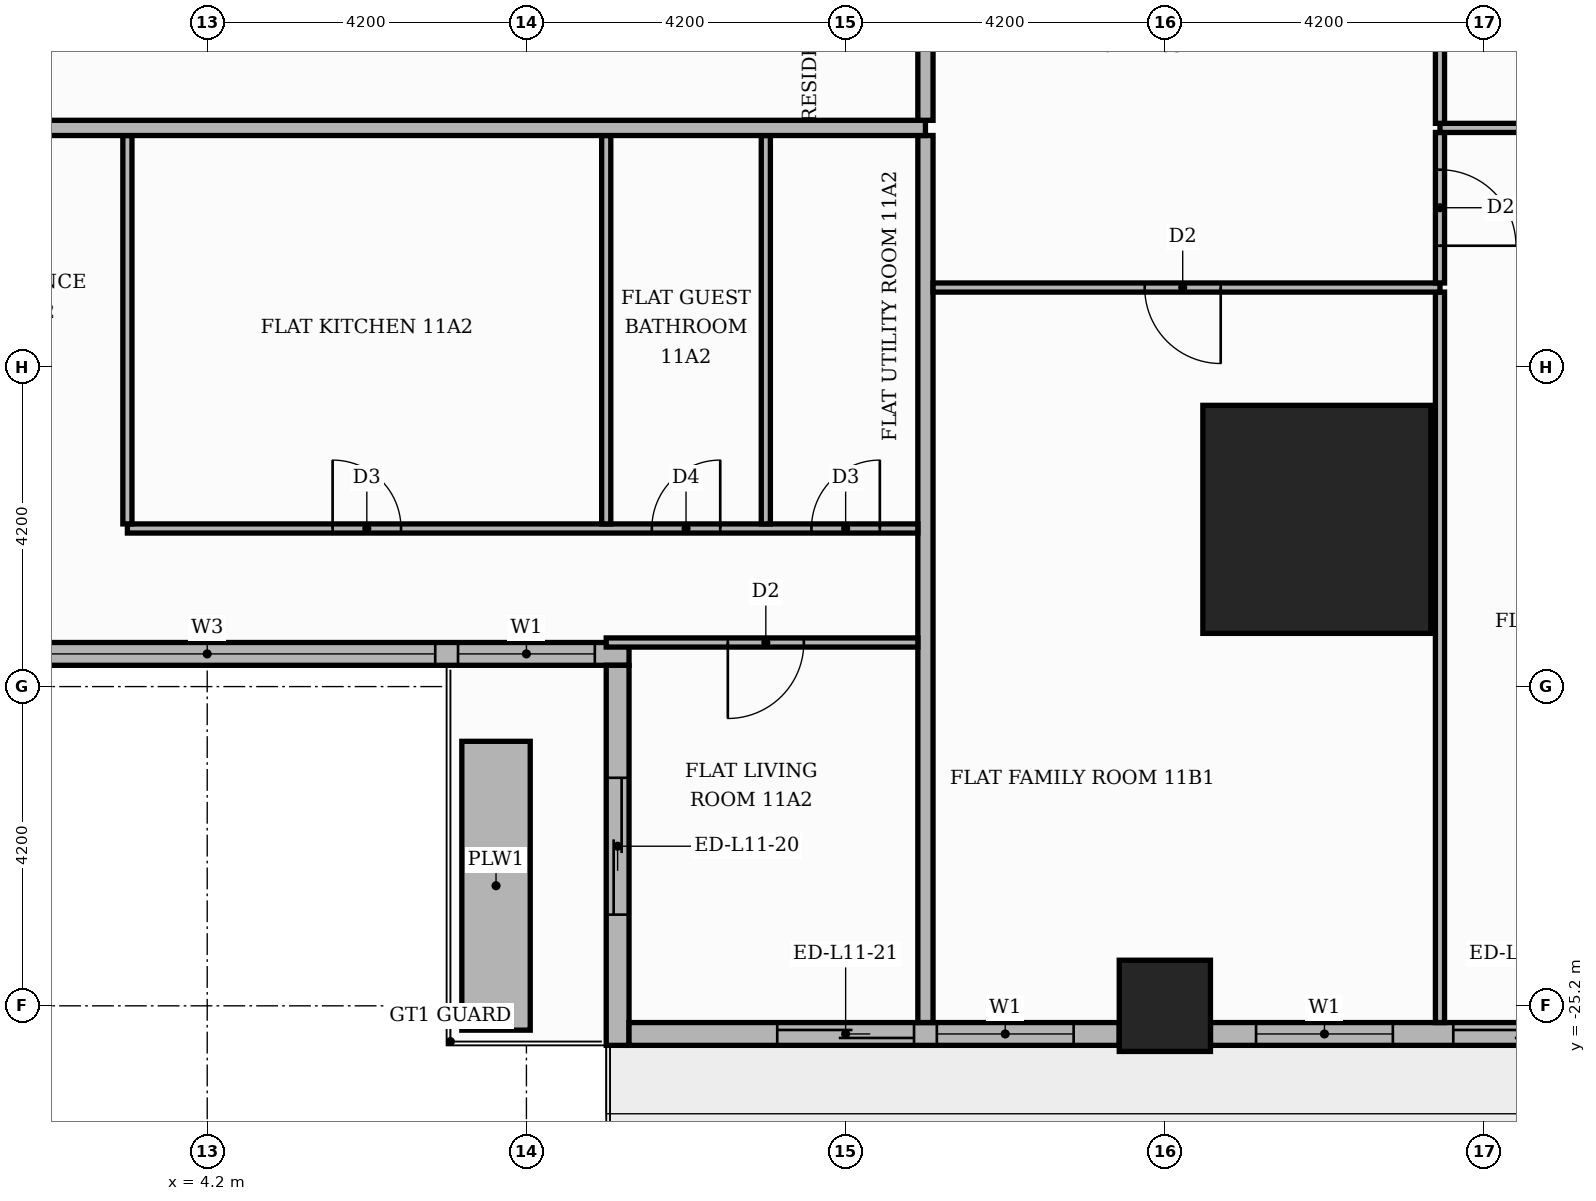
"""IFC4 building model, lengths in metres.
Left out: names, types, materials, properties, quantities, classifications, styles, units other than length and angle.
Written with IfcOpenShell. Run it as: python <this file> out.ifc"""

import sys

from ifc_helpers import new_model, si_unit, direction, frame, frame_2d, origin, origin_2d, place, context, subcontext, project, spatial, rectangle, extrude, element, fill, save


model = new_model("IFC4")
c1 = context("Model", 3, precision=1e-05, world=origin(), true_north=direction((0.0, 1.0)))
c2 = subcontext(c1, "Body", "Model", "MODEL_VIEW")
j1 = project(units=[si_unit("LENGTHUNIT", "METRE"), si_unit("PLANEANGLEUNIT", "RADIAN")], contexts=[c1])
p1 = place(None, origin())
s1 = spatial("IfcSite", under=j1, at=p1, CompositionType="ELEMENT")
p2 = place(p1, origin())
s2 = spatial("IfcBuilding", under=s1, at=p2, CompositionType="ELEMENT")
p3 = place(p2, frame((0.0, 0.0, 50.4)))
s3 = spatial("IfcBuildingStorey", under=s2, at=p3, CompositionType="ELEMENT", Elevation=50.4)
p4 = place(p3, frame((18.8, -18.8, 0.0), z_axis=(0.0, 0.0, 1.0), x_axis=(1.0, 0.0, 0.0)))
e1 = element("IfcColumn", 1, at=p4, inside=s3, PredefinedType="COLUMN", context=c2, shape_type="SweptSolid", body=[
    extrude(rectangle(XDim=3.0, YDim=3.0, at=origin_2d()), origin(), (0.0, 0.0, 1.0), 3.9),
])
p5 = place(p3, frame((16.8, -25.2, 0.0), z_axis=(0.0, 0.0, 1.0), x_axis=(1.0, 0.0, 0.0)))
e2 = element("IfcColumn", 2, at=p5, inside=s3, PredefinedType="COLUMN", context=c2, shape_type="SweptSolid", body=[
    extrude(rectangle(XDim=1.2, YDim=1.2, at=origin_2d()), origin(), (0.0, 0.0, 1.0), 3.9),
])
p6 = place(p3, frame((-9.45, -20.57, 0.0), z_axis=(0.0, 0.0, 1.0), x_axis=(1.0, 0.0, 0.0)))
e3 = element("IfcWall", 3, at=p6, inside=s3, PredefinedType="STANDARD", context=c2, shape_type="SweptSolid", body=[
    extrude(rectangle(XDim=19.2, YDim=0.3, at=frame_2d((9.6, 0.0))), origin(), (0.0, 0.0, 1.0), 3.48),
])
p7 = place(p6, frame((0.15, 0.0, 0.9)))
e4 = element("IfcOpeningElement", 4, at=p7, cuts=e3, PredefinedType="OPENING", context=c2, shape_type="SweptSolid", body=[
    extrude(rectangle(XDim=3.9, YDim=2.1, at=frame_2d((1.95, 1.05))), frame((0.0, 0.16, 0.0), z_axis=(0.0, -1.0, 0.0), x_axis=(1.0, 0.0, 0.0)), (0.0, 0.0, 1.0), 0.32),
])
p8 = place(p6, frame((4.35, 0.0, 0.9)))
e5 = element("IfcOpeningElement", 5, at=p8, cuts=e3, PredefinedType="OPENING", context=c2, shape_type="SweptSolid", body=[
    extrude(rectangle(XDim=6.0, YDim=2.1, at=frame_2d((3.0, 1.05))), frame((0.0, 0.16, 0.0), z_axis=(0.0, -1.0, 0.0), x_axis=(1.0, 0.0, 0.0)), (0.0, 0.0, 1.0), 0.32),
])
p9 = place(p6, frame((10.65, 0.0, 0.9)))
e6 = element("IfcOpeningElement", 6, at=p9, cuts=e3, PredefinedType="OPENING", context=c2, shape_type="SweptSolid", body=[
    extrude(rectangle(XDim=6.0, YDim=2.1, at=frame_2d((3.0, 1.05))), frame((0.0, 0.16, 0.0), z_axis=(0.0, -1.0, 0.0), x_axis=(1.0, 0.0, 0.0)), (0.0, 0.0, 1.0), 0.32),
])
p10 = place(p6, frame((16.95, 0.0, 0.9)))
e7 = element("IfcOpeningElement", 7, at=p10, cuts=e3, PredefinedType="OPENING", context=c2, shape_type="SweptSolid", body=[
    extrude(rectangle(XDim=1.8, YDim=2.1, at=frame_2d((0.9, 1.05))), frame((0.0, 0.16, 0.0), z_axis=(0.0, -1.0, 0.0), x_axis=(1.0, 0.0, 0.0)), (0.0, 0.0, 1.0), 0.32),
])
p11 = place(p3, frame((9.6, -20.72, 0.0), z_axis=(0.0, 0.0, 1.0), x_axis=(0.0, -1.0, 0.0)))
e8 = element("IfcWall", 8, at=p11, inside=s3, PredefinedType="STANDARD", context=c2, shape_type="SweptSolid", body=[
    extrude(rectangle(XDim=5.0, YDim=0.3, at=frame_2d((2.5, 0.0))), origin(), (0.0, 0.0, 1.0), 3.48),
])
p12 = place(p11, frame((1.48, 0.0, 0.0)))
e9 = element("IfcOpeningElement", 9, at=p12, cuts=e8, PredefinedType="OPENING", context=c2, shape_type="SweptSolid", body=[
    extrude(rectangle(XDim=1.8, YDim=2.4, at=frame_2d((0.9, 1.2))), frame((0.0, 0.16, 0.0), z_axis=(0.0, -1.0, 0.0), x_axis=(1.0, 0.0, 0.0)), (0.0, 0.0, 1.0), 0.32),
])
p13 = place(p3, frame((9.75, -25.57, 0.0), z_axis=(0.0, 0.0, 1.0), x_axis=(1.0, 0.0, 0.0)))
e10 = element("IfcWall", 10, at=p13, inside=s3, PredefinedType="STANDARD", context=c2, shape_type="SweptSolid", body=[
    extrude(rectangle(XDim=6.45, YDim=0.3, at=frame_2d((3.225, 0.0))), origin(), (0.0, 0.0, 1.0), 3.48),
])
p14 = place(p13, frame((1.95, 0.0, 0.0)))
e11 = element("IfcOpeningElement", 11, at=p14, cuts=e10, PredefinedType="OPENING", context=c2, shape_type="SweptSolid", body=[
    extrude(rectangle(XDim=1.8, YDim=2.4, at=frame_2d((0.9, 1.2))), frame((0.0, 0.16, 0.0), z_axis=(0.0, -1.0, 0.0), x_axis=(1.0, 0.0, 0.0)), (0.0, 0.0, 1.0), 0.32),
])
p15 = place(p13, frame((4.05, 0.0, 0.9)))
e12 = element("IfcOpeningElement", 12, at=p15, cuts=e10, PredefinedType="OPENING", context=c2, shape_type="SweptSolid", body=[
    extrude(rectangle(XDim=1.8, YDim=2.1, at=frame_2d((0.9, 1.05))), frame((0.0, 0.16, 0.0), z_axis=(0.0, -1.0, 0.0), x_axis=(1.0, 0.0, 0.0)), (0.0, 0.0, 1.0), 0.32),
])
p16 = place(p3, frame((17.4, -25.57, 0.0), z_axis=(0.0, 0.0, 1.0), x_axis=(1.0, 0.0, 0.0)))
e13 = element("IfcWall", 13, at=p16, inside=s3, PredefinedType="STANDARD", context=c2, shape_type="SweptSolid", body=[
    extrude(rectangle(XDim=5.32, YDim=0.3, at=frame_2d((2.66, 0.0))), origin(), (0.0, 0.0, 1.0), 3.48),
])
p17 = place(p16, frame((0.6, 0.0, 0.9)))
e14 = element("IfcOpeningElement", 14, at=p17, cuts=e13, PredefinedType="OPENING", context=c2, shape_type="SweptSolid", body=[
    extrude(rectangle(XDim=1.8, YDim=2.1, at=frame_2d((0.9, 1.05))), frame((0.0, 0.16, 0.0), z_axis=(0.0, -1.0, 0.0), x_axis=(1.0, 0.0, 0.0)), (0.0, 0.0, 1.0), 0.32),
])
p18 = place(p16, frame((3.195, 0.0, 0.0)))
e15 = element("IfcOpeningElement", 15, at=p18, cuts=e13, PredefinedType="OPENING", context=c2, shape_type="SweptSolid", body=[
    extrude(rectangle(XDim=1.8, YDim=2.4, at=frame_2d((0.9, 1.2))), frame((0.0, 0.16, 0.0), z_axis=(0.0, -1.0, 0.0), x_axis=(1.0, 0.0, 0.0)), (0.0, 0.0, 1.0), 0.32),
])
p19 = place(p3, frame((8.0, -25.52, 0.0), z_axis=(0.0, 0.0, 1.0), x_axis=(0.0, 1.0, 0.0)))
e16 = element("IfcWall", 16, at=p19, inside=s3, PredefinedType="MOVABLE", context=c2, shape_type="SweptSolid", body=[
    extrude(rectangle(XDim=3.8, YDim=0.9, at=frame_2d((1.9, 0.0))), origin(), (0.0, 0.0, 1.0), 0.6),
])
p20 = place(p3, frame((13.65, -25.42, 0.0), z_axis=(0.0, 0.0, 1.0), x_axis=(0.0, 1.0, 0.0)))
e17 = element("IfcWall", 17, at=p20, inside=s3, PredefinedType="PARTITIONING", context=c2, shape_type="SweptSolid", body=[
    extrude(rectangle(XDim=11.67, YDim=0.2, at=frame_2d((5.835, 0.0))), origin(), (0.0, 0.0, 1.0), 3.48),
])
p21 = place(p3, frame((20.42, -25.42, 0.0), z_axis=(0.0, 0.0, 1.0), x_axis=(0.0, 1.0, 0.0)))
e18 = element("IfcWall", 18, at=p21, inside=s3, PredefinedType="PARTITIONING", context=c2, shape_type="SweptSolid", body=[
    extrude(rectangle(XDim=9.61, YDim=0.12, at=frame_2d((4.805, 0.0))), origin(), (0.0, 0.0, 1.0), 3.48),
])
p22 = place(p3, frame((9.45, -20.42, 0.0), z_axis=(0.0, 0.0, 1.0), x_axis=(1.0, 0.0, 0.0)))
e19 = element("IfcWall", 19, at=p22, inside=s3, PredefinedType="PARTITIONING", context=c2, shape_type="SweptSolid", body=[
    extrude(rectangle(XDim=4.1, YDim=0.12, at=frame_2d((2.05, 0.0))), origin(), (0.0, 0.0, 1.0), 3.48),
])
p23 = place(p22, frame((1.6, 0.0, 0.0)))
e20 = element("IfcOpeningElement", 20, at=p23, cuts=e19, PredefinedType="OPENING", context=c2, shape_type="SweptSolid", body=[
    extrude(rectangle(XDim=1.0, YDim=2.1, at=frame_2d((0.5, 1.05))), frame((0.0, 0.07, 0.0), z_axis=(0.0, -1.0, 0.0), x_axis=(1.0, 0.0, 0.0)), (0.0, 0.0, 1.0), 0.14),
])
p24 = place(p3, frame((3.15, -18.92, 0.0), z_axis=(0.0, 0.0, 1.0), x_axis=(1.0, 0.0, 0.0)))
e21 = element("IfcWall", 21, at=p24, inside=s3, PredefinedType="PARTITIONING", context=c2, shape_type="SweptSolid", body=[
    extrude(rectangle(XDim=10.4, YDim=0.12, at=frame_2d((5.2, 0.0))), origin(), (0.0, 0.0, 1.0), 3.48),
])
p25 = place(p24, frame((2.7, 0.0, 0.0)))
e22 = element("IfcOpeningElement", 22, at=p25, cuts=e21, PredefinedType="OPENING", context=c2, shape_type="SweptSolid", body=[
    extrude(rectangle(XDim=0.9, YDim=2.1, at=frame_2d((0.45, 1.05))), frame((0.0, 0.07, 0.0), z_axis=(0.0, -1.0, 0.0), x_axis=(1.0, 0.0, 0.0)), (0.0, 0.0, 1.0), 0.14),
])
p26 = place(p24, frame((6.9, 0.0, 0.0)))
e23 = element("IfcOpeningElement", 23, at=p26, cuts=e21, PredefinedType="OPENING", context=c2, shape_type="SweptSolid", body=[
    extrude(rectangle(XDim=0.9, YDim=2.1, at=frame_2d((0.45, 1.05))), frame((0.0, 0.07, 0.0), z_axis=(0.0, -1.0, 0.0), x_axis=(1.0, 0.0, 0.0)), (0.0, 0.0, 1.0), 0.14),
])
p27 = place(p24, frame((9.0, 0.0, 0.0)))
e24 = element("IfcOpeningElement", 24, at=p27, cuts=e21, PredefinedType="OPENING", context=c2, shape_type="SweptSolid", body=[
    extrude(rectangle(XDim=0.9, YDim=2.1, at=frame_2d((0.45, 1.05))), frame((0.0, 0.07, 0.0), z_axis=(0.0, -1.0, 0.0), x_axis=(1.0, 0.0, 0.0)), (0.0, 0.0, 1.0), 0.14),
])
for number, where, z_axis, x_axis in (
    (25, (3.15, -18.86, 0.0), (0.0, 0.0, 1.0), (0.0, 1.0, 0.0)),
    (26, (9.45, -18.86, 0.0), (0.0, 0.0, 1.0), (0.0, 1.0, 0.0)),
    (27, (11.55, -18.86, 0.0), (0.0, 0.0, 1.0), (0.0, 1.0, 0.0)),
):
    element("IfcWall", number, at=place(p3, frame(where, z_axis=z_axis, x_axis=x_axis)), inside=s3, PredefinedType="PARTITIONING", context=c2, shape_type="SweptSolid", body=[
        extrude(rectangle(XDim=5.11, YDim=0.12, at=frame_2d((2.555, 0.0))), origin(), (0.0, 0.0, 1.0), 3.48),
    ])
p28 = place(p3, frame((13.75, -15.75, 0.0), z_axis=(0.0, 0.0, 1.0), x_axis=(1.0, 0.0, 0.0)))
e28 = element("IfcWall", 28, at=p28, inside=s3, PredefinedType="PARTITIONING", context=c2, shape_type="SweptSolid", body=[
    extrude(rectangle(XDim=6.67, YDim=0.12, at=frame_2d((3.335, 0.0))), origin(), (0.0, 0.0, 1.0), 3.48),
])
p29 = place(p28, frame((2.785, 0.0, 0.0)))
e29 = element("IfcOpeningElement", 29, at=p29, cuts=e28, PredefinedType="OPENING", context=c2, shape_type="SweptSolid", body=[
    extrude(rectangle(XDim=1.0, YDim=2.1, at=frame_2d((0.5, 1.05))), frame((0.0, 0.07, 0.0), z_axis=(0.0, -1.0, 0.0), x_axis=(1.0, 0.0, 0.0)), (0.0, 0.0, 1.0), 0.14),
])
p30 = place(p3, frame((20.42, -15.69, 0.0), z_axis=(0.0, 0.0, 1.0), x_axis=(0.0, 1.0, 0.0)))
e30 = element("IfcWall", 30, at=p30, inside=s3, PredefinedType="PARTITIONING", context=c2, shape_type="SweptSolid", body=[
    extrude(rectangle(XDim=1.98, YDim=0.12, at=frame_2d((0.99, 0.0))), origin(), (0.0, 0.0, 1.0), 3.48),
])
p31 = place(p30, frame((0.49, 0.0, 0.0)))
e31 = element("IfcOpeningElement", 31, at=p31, cuts=e30, PredefinedType="OPENING", context=c2, shape_type="SweptSolid", body=[
    extrude(rectangle(XDim=1.0, YDim=2.1, at=frame_2d((0.5, 1.05))), frame((0.0, 0.07, 0.0), z_axis=(0.0, -1.0, 0.0), x_axis=(1.0, 0.0, 0.0)), (0.0, 0.0, 1.0), 0.14),
])
p32 = place(p3, frame((-25.42, -13.65, 0.0), z_axis=(0.0, 0.0, 1.0), x_axis=(1.0, 0.0, 0.0)))
e32 = element("IfcWall", 32, at=p32, inside=s3, PredefinedType="PARTITIONING", context=c2, shape_type="SweptSolid", body=[
    extrude(rectangle(XDim=39.07, YDim=0.2, at=frame_2d((19.535, 0.0))), origin(), (0.0, 0.0, 1.0), 3.48),
])
p33 = place(p32, frame((13.32, 0.0, 0.0)))
e33 = element("IfcOpeningElement", 33, at=p33, cuts=e32, PredefinedType="OPENING", context=c2, shape_type="SweptSolid", body=[
    extrude(rectangle(XDim=1.1, YDim=2.4, at=frame_2d((0.55, 1.2))), frame((0.0, 0.11, 0.0), z_axis=(0.0, -1.0, 0.0), x_axis=(1.0, 0.0, 0.0)), (0.0, 0.0, 1.0), 0.22),
])
p34 = place(p32, frame((25.92, 0.0, 0.0)))
e34 = element("IfcOpeningElement", 34, at=p34, cuts=e32, PredefinedType="OPENING", context=c2, shape_type="SweptSolid", body=[
    extrude(rectangle(XDim=1.1, YDim=2.4, at=frame_2d((0.55, 1.2))), frame((0.0, 0.11, 0.0), z_axis=(0.0, -1.0, 0.0), x_axis=(1.0, 0.0, 0.0)), (0.0, 0.0, 1.0), 0.22),
])
p35 = place(p3, frame((20.42, -13.65, 0.0), z_axis=(0.0, 0.0, 1.0), x_axis=(1.0, 0.0, 0.0)))
e35 = element("IfcWall", 35, at=p35, inside=s3, PredefinedType="PARTITIONING", context=c2, shape_type="SweptSolid", body=[
    extrude(rectangle(XDim=5.0, YDim=0.12, at=frame_2d((2.5, 0.0))), origin(), (0.0, 0.0, 1.0), 3.48),
])
p36 = place(p3, frame((20.42, -13.59, 0.0), z_axis=(0.0, 0.0, 1.0), x_axis=(0.0, 1.0, 0.0)))
e36 = element("IfcWall", 36, at=p36, inside=s3, PredefinedType="PARTITIONING", context=c2, shape_type="SweptSolid", body=[
    extrude(rectangle(XDim=4.08, YDim=0.12, at=frame_2d((2.04, 0.0))), origin(), (0.0, 0.0, 1.0), 3.48),
])
p37 = place(p36, frame((1.59, 0.0, 0.0)))
e37 = element("IfcOpeningElement", 37, at=p37, cuts=e36, PredefinedType="OPENING", context=c2, shape_type="SweptSolid", body=[
    extrude(rectangle(XDim=0.9, YDim=2.1, at=frame_2d((0.45, 1.05))), frame((0.0, 0.07, 0.0), z_axis=(0.0, -1.0, 0.0), x_axis=(1.0, 0.0, 0.0)), (0.0, 0.0, 1.0), 0.14),
])
p38 = place(p3, frame((13.65, -13.55, 0.0), z_axis=(0.0, 0.0, 1.0), x_axis=(0.0, 1.0, 0.0)))
e38 = element("IfcWall", 38, at=p38, inside=s3, PredefinedType="PARTITIONING", context=c2, shape_type="SweptSolid", body=[
    extrude(rectangle(XDim=27.1, YDim=0.2, at=frame_2d((13.55, 0.0))), origin(), (0.0, 0.0, 1.0), 3.48),
])
p39 = place(p38, frame((1.45, 0.0, 0.0)))
e39 = element("IfcOpeningElement", 39, at=p39, cuts=e38, PredefinedType="OPENING", context=c2, shape_type="SweptSolid", body=[
    extrude(rectangle(XDim=1.1, YDim=2.4, at=frame_2d((0.55, 1.2))), frame((0.0, 0.11, 0.0), z_axis=(0.0, -1.0, 0.0), x_axis=(1.0, 0.0, 0.0)), (0.0, 0.0, 1.0), 0.22),
])
p40 = place(p9, origin())
e40 = element("IfcWindow", 40, at=p40, inside=s3, PartitioningType="SINGLE_PANEL", PredefinedType="WINDOW", context=c2, shape_type="SweptSolid", body=[
    extrude(rectangle(XDim=6.0, YDim=2.1, at=frame_2d((3.0, 1.05))), frame((0.0, 0.03, 0.0), z_axis=(0.0, -1.0, 0.0), x_axis=(1.0, 0.0, 0.0)), (0.0, 0.0, 1.0), 0.06),
])
fill(e6, e40)
p41 = place(p10, origin())
e41 = element("IfcWindow", 41, at=p41, inside=s3, PartitioningType="SINGLE_PANEL", PredefinedType="WINDOW", context=c2, shape_type="SweptSolid", body=[
    extrude(rectangle(XDim=1.8, YDim=2.1, at=frame_2d((0.9, 1.05))), frame((0.0, 0.03, 0.0), z_axis=(0.0, -1.0, 0.0), x_axis=(1.0, 0.0, 0.0)), (0.0, 0.0, 1.0), 0.06),
])
fill(e7, e41)
p42 = place(p12, origin())
e42 = element("IfcDoor", 42, at=p42, inside=s3, OperationType="SLIDING_TO_RIGHT", PredefinedType="DOOR", context=c2, shape_type="SweptSolid", body=[
    extrude(rectangle(XDim=1.8, YDim=2.4, at=frame_2d((0.9, 1.2))), frame((0.0, 0.025, 0.0), z_axis=(0.0, -1.0, 0.0), x_axis=(1.0, 0.0, 0.0)), (0.0, 0.0, 1.0), 0.05),
])
fill(e9, e42)
p43 = place(p14, origin())
e43 = element("IfcDoor", 43, at=p43, inside=s3, OperationType="SLIDING_TO_RIGHT", PredefinedType="DOOR", context=c2, shape_type="SweptSolid", body=[
    extrude(rectangle(XDim=1.8, YDim=2.4, at=frame_2d((0.9, 1.2))), frame((0.0, 0.025, 0.0), z_axis=(0.0, -1.0, 0.0), x_axis=(1.0, 0.0, 0.0)), (0.0, 0.0, 1.0), 0.05),
])
fill(e11, e43)
p44 = place(p15, origin())
e44 = element("IfcWindow", 44, at=p44, inside=s3, PartitioningType="SINGLE_PANEL", PredefinedType="WINDOW", context=c2, shape_type="SweptSolid", body=[
    extrude(rectangle(XDim=1.8, YDim=2.1, at=frame_2d((0.9, 1.05))), frame((0.0, 0.03, 0.0), z_axis=(0.0, -1.0, 0.0), x_axis=(1.0, 0.0, 0.0)), (0.0, 0.0, 1.0), 0.06),
])
fill(e12, e44)
p45 = place(p17, origin())
e45 = element("IfcWindow", 45, at=p45, inside=s3, PartitioningType="SINGLE_PANEL", PredefinedType="WINDOW", context=c2, shape_type="SweptSolid", body=[
    extrude(rectangle(XDim=1.8, YDim=2.1, at=frame_2d((0.9, 1.05))), frame((0.0, 0.03, 0.0), z_axis=(0.0, -1.0, 0.0), x_axis=(1.0, 0.0, 0.0)), (0.0, 0.0, 1.0), 0.06),
])
fill(e14, e45)
p46 = place(p18, origin())
e46 = element("IfcDoor", 46, at=p46, inside=s3, OperationType="SLIDING_TO_RIGHT", PredefinedType="DOOR", context=c2, shape_type="SweptSolid", body=[
    extrude(rectangle(XDim=1.8, YDim=2.4, at=frame_2d((0.9, 1.2))), frame((0.0, 0.025, 0.0), z_axis=(0.0, -1.0, 0.0), x_axis=(1.0, 0.0, 0.0)), (0.0, 0.0, 1.0), 0.05),
])
fill(e15, e46)
p47 = place(p25, origin())
e47 = element("IfcDoor", 47, at=p47, inside=s3, OperationType="SINGLE_SWING_LEFT", PredefinedType="DOOR", context=c2, shape_type="SweptSolid", body=[
    extrude(rectangle(XDim=0.9, YDim=2.1, at=frame_2d((0.45, 1.05))), frame((0.0, 0.025, 0.0), z_axis=(0.0, -1.0, 0.0), x_axis=(1.0, 0.0, 0.0)), (0.0, 0.0, 1.0), 0.05),
])
fill(e22, e47)
p48 = place(p26, origin())
e48 = element("IfcDoor", 48, at=p48, inside=s3, OperationType="SINGLE_SWING_RIGHT", PredefinedType="DOOR", context=c2, shape_type="SweptSolid", body=[
    extrude(rectangle(XDim=0.9, YDim=2.1, at=frame_2d((0.45, 1.05))), frame((0.0, 0.025, 0.0), z_axis=(0.0, -1.0, 0.0), x_axis=(1.0, 0.0, 0.0)), (0.0, 0.0, 1.0), 0.05),
])
fill(e23, e48)
p49 = place(p27, origin())
e49 = element("IfcDoor", 49, at=p49, inside=s3, OperationType="SINGLE_SWING_RIGHT", PredefinedType="DOOR", context=c2, shape_type="SweptSolid", body=[
    extrude(rectangle(XDim=0.9, YDim=2.1, at=frame_2d((0.45, 1.05))), frame((0.0, 0.025, 0.0), z_axis=(0.0, -1.0, 0.0), x_axis=(1.0, 0.0, 0.0)), (0.0, 0.0, 1.0), 0.05),
])
fill(e24, e49)
p50 = place(p23, frame((1.0, 0.0, 0.0), z_axis=(0.0, 0.0, 1.0), x_axis=(-1.0, 0.0, 0.0)))
e50 = element("IfcDoor", 50, at=p50, inside=s3, OperationType="SINGLE_SWING_LEFT", PredefinedType="DOOR", context=c2, shape_type="SweptSolid", body=[
    extrude(rectangle(XDim=1.0, YDim=2.1, at=frame_2d((0.5, 1.05))), frame((0.0, 0.025, 0.0), z_axis=(0.0, -1.0, 0.0), x_axis=(1.0, 0.0, 0.0)), (0.0, 0.0, 1.0), 0.05),
])
fill(e20, e50)
p51 = place(p29, frame((1.0, 0.0, 0.0), z_axis=(0.0, 0.0, 1.0), x_axis=(-1.0, 0.0, 0.0)))
e51 = element("IfcDoor", 51, at=p51, inside=s3, OperationType="SINGLE_SWING_RIGHT", PredefinedType="DOOR", context=c2, shape_type="SweptSolid", body=[
    extrude(rectangle(XDim=1.0, YDim=2.1, at=frame_2d((0.5, 1.05))), frame((0.0, 0.025, 0.0), z_axis=(0.0, -1.0, 0.0), x_axis=(1.0, 0.0, 0.0)), (0.0, 0.0, 1.0), 0.05),
])
fill(e29, e51)
p52 = place(p31, frame((1.0, 0.0, 0.0), z_axis=(0.0, 0.0, 1.0), x_axis=(-1.0, 0.0, 0.0)))
e52 = element("IfcDoor", 52, at=p52, inside=s3, OperationType="SINGLE_SWING_LEFT", PredefinedType="DOOR", context=c2, shape_type="SweptSolid", body=[
    extrude(rectangle(XDim=1.0, YDim=2.1, at=frame_2d((0.5, 1.05))), frame((0.0, 0.025, 0.0), z_axis=(0.0, -1.0, 0.0), x_axis=(1.0, 0.0, 0.0)), (0.0, 0.0, 1.0), 0.05),
])
fill(e31, e52)
save(model, sys.argv[1])
